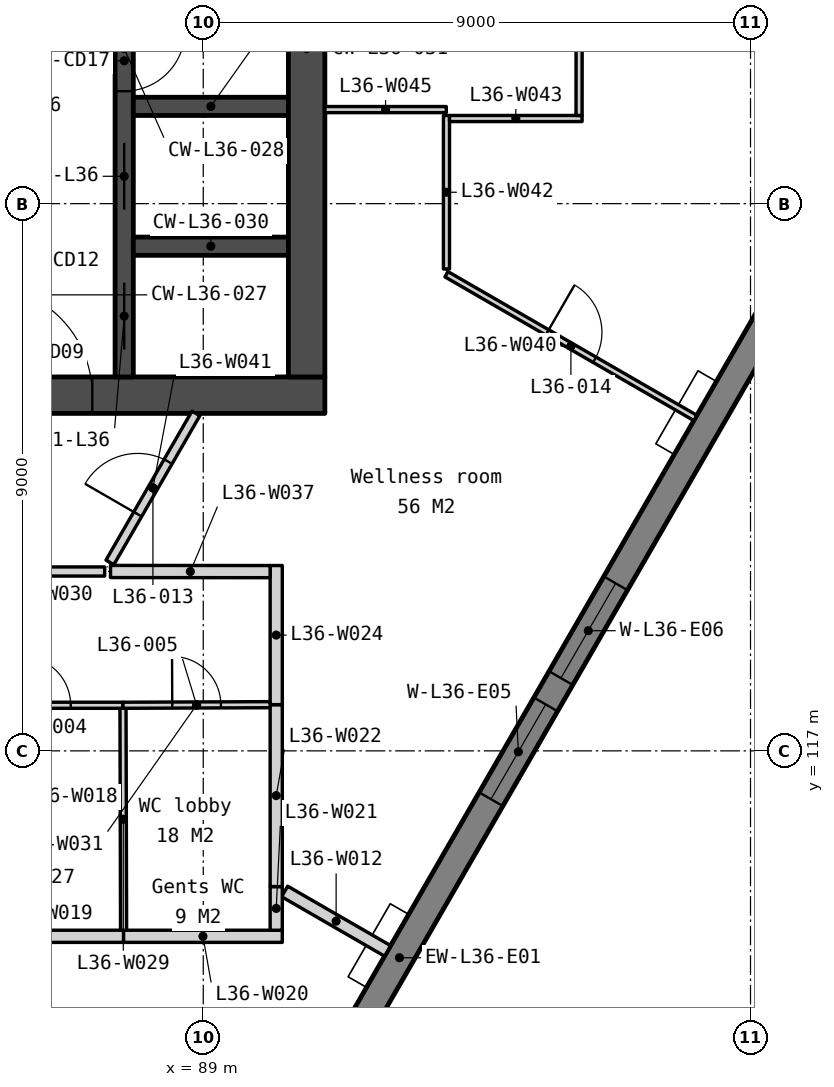
"""IFC4 building model, lengths in metres.
Left out: names, types, materials, properties, quantities, classifications, styles, units other than length and angle.
Written with IfcOpenShell. Run it as: python <this file> out.ifc"""

import sys

from ifc_helpers import new_model, si_unit, direction, frame, frame_2d, origin, place, context, subcontext, project, spatial, polyline, rectangle, outline, extrude, element, fill, save


model = new_model("IFC4")
c1 = context("Model", 3, precision=1e-05, world=origin(), true_north=direction((0.0, 1.0)))
c2 = subcontext(c1, "Body", "Model", "MODEL_VIEW")
j1 = project(units=[si_unit("LENGTHUNIT", "METRE"), si_unit("PLANEANGLEUNIT", "RADIAN")], contexts=[c1])
p1 = place(None, origin())
s1 = spatial("IfcSite", under=j1, at=p1, CompositionType="ELEMENT")
p2 = place(p1, origin())
s2 = spatial("IfcBuilding", under=s1, at=p2, CompositionType="ELEMENT")
p3 = place(p2, frame((0.0, 0.0, 144.2)))
s3 = spatial("IfcBuildingStorey", under=s2, at=p3, CompositionType="ELEMENT", Elevation=144.2)
p4 = place(p3, frame((69.0, 122.85, 0.0), z_axis=(0.0, 0.0, 1.0), x_axis=(1.0, 0.0, 0.0)))
e1 = element("IfcWall", 1, at=p4, inside=s3, PredefinedType="SOLIDWALL", context=c2, shape_type="SweptSolid", body=[
    extrude(rectangle(XDim=22.0, YDim=0.6, at=frame_2d((11.0, 0.0))), origin(), (0.0, 0.0, 1.0), 3.75),
])
p5 = place(p4, frame((16.375, 0.0, 0.0)))
e2 = element("IfcOpeningElement", 2, at=p5, cuts=e1, PredefinedType="OPENING", context=c2, shape_type="SweptSolid", body=[
    extrude(rectangle(XDim=1.8, YDim=2.1, at=frame_2d((0.9, 1.05))), frame((0.0, 0.31, 0.0), z_axis=(0.0, -1.0, 0.0), x_axis=(1.0, 0.0, 0.0)), (0.0, 0.0, 1.0), 0.62),
])
p6 = place(p4, frame((3.825, 0.0, 0.0)))
e3 = element("IfcOpeningElement", 3, at=p6, cuts=e1, PredefinedType="OPENING", context=c2, shape_type="SweptSolid", body=[
    extrude(rectangle(XDim=1.8, YDim=2.1, at=frame_2d((0.9, 1.05))), frame((0.0, 0.31, 0.0), z_axis=(0.0, -1.0, 0.0), x_axis=(1.0, 0.0, 0.0)), (0.0, 0.0, 1.0), 0.62),
])
p7 = place(p4, frame((12.85, 0.0, 0.0)))
e4 = element("IfcOpeningElement", 4, at=p7, cuts=e1, PredefinedType="OPENING", context=c2, shape_type="SweptSolid", body=[
    extrude(rectangle(XDim=1.5, YDim=2.1, at=frame_2d((0.75, 1.05))), frame((0.0, 0.31, 0.0), z_axis=(0.0, -1.0, 0.0), x_axis=(1.0, 0.0, 0.0)), (0.0, 0.0, 1.0), 0.62),
])
p8 = place(p3, frame((87.7, 133.95, 0.0), z_axis=(0.0, 0.0, 1.0), x_axis=(0.0, -1.0, 0.0)))
e5 = element("IfcWall", 5, at=p8, inside=s3, PredefinedType="SOLIDWALL", context=c2, shape_type="SweptSolid", body=[
    extrude(rectangle(XDim=10.8, YDim=0.3, at=frame_2d((5.4, 0.0))), origin(), (0.0, 0.0, 1.0), 3.75),
])
p9 = place(p8, frame((6.95, 0.0, 0.0)))
e6 = element("IfcOpeningElement", 6, at=p9, cuts=e5, PredefinedType="OPENING", context=c2, shape_type="SweptSolid", body=[
    extrude(rectangle(XDim=1.1, YDim=2.1, at=frame_2d((0.55, 1.05))), frame((0.0, 0.16, 0.0), z_axis=(0.0, -1.0, 0.0), x_axis=(1.0, 0.0, 0.0)), (0.0, 0.0, 1.0), 0.32),
])
p10 = place(p8, frame((5.1, 0.0, 0.0)))
e7 = element("IfcOpeningElement", 7, at=p10, cuts=e5, PredefinedType="OPENING", context=c2, shape_type="SweptSolid", body=[
    extrude(rectangle(XDim=1.0, YDim=2.1, at=frame_2d((0.5, 1.05))), frame((0.0, 0.16, 0.0), z_axis=(0.0, -1.0, 0.0), x_axis=(1.0, 0.0, 0.0)), (0.0, 0.0, 1.0), 0.32),
])
p11 = place(p8, frame((9.25, 0.0, 0.0)))
e8 = element("IfcOpeningElement", 8, at=p11, cuts=e5, PredefinedType="OPENING", context=c2, shape_type="SweptSolid", body=[
    extrude(rectangle(XDim=1.1, YDim=2.1, at=frame_2d((0.55, 1.05))), frame((0.0, 0.16, 0.0), z_axis=(0.0, -1.0, 0.0), x_axis=(1.0, 0.0, 0.0)), (0.0, 0.0, 1.0), 0.32),
])
for number, where, z_axis, x_axis in (
    (9, (87.85, 127.6, 0.0), (0.0, 0.0, 1.0), (1.0, 0.0, 0.0)),
    (10, (87.85, 125.3, 0.0), (0.0, 0.0, 1.0), (1.0, 0.0, 0.0)),
):
    element("IfcWall", number, at=place(p3, frame(where, z_axis=z_axis, x_axis=x_axis)), inside=s3, PredefinedType="SOLIDWALL", context=c2, shape_type="SweptSolid", body=[
        extrude(rectangle(XDim=2.55, YDim=0.3, at=frame_2d((1.275, 0.0))), origin(), (0.0, 0.0, 1.0), 3.75),
    ])
p12 = place(p3, frame((90.7, 133.95, 0.0), z_axis=(0.0, 0.0, 1.0), x_axis=(0.0, -1.0, 0.0)))
e11 = element("IfcWall", 11, at=p12, inside=s3, PredefinedType="SOLIDWALL", context=c2, shape_type="SweptSolid", body=[
    extrude(rectangle(XDim=10.8, YDim=0.6, at=frame_2d((5.4, 0.0))), origin(), (0.0, 0.0, 1.0), 3.75),
])
p13 = place(p3, frame((82.105, 96.067, -0.15), z_axis=(0.0, 0.0, 1.0), x_axis=(0.499997369791, 0.866026922331, 0.0)))
e12 = element("IfcWall", 12, at=p13, inside=s3, PredefinedType="SOLIDWALL", context=c2, shape_type="SweptSolid", body=[
    extrude(outline(polyline([(40.486, 0.0), (40.486, 3.9), (0.0, 3.9), (0.0, 0.0), (40.486, 0.0)])), frame((0.0, 0.225, 0.0), z_axis=(0.0, -1.0, 0.0), x_axis=(1.0, 0.0, 0.0)), (0.0, 0.0, 1.0), 0.45),
])
p14 = place(p13, frame((3.011, 0.0, 0.95)))
e13 = element("IfcOpeningElement", 13, at=p14, cuts=e12, PredefinedType="OPENING", context=c2, shape_type="SweptSolid", body=[
    extrude(rectangle(XDim=1.8, YDim=2.2, at=frame_2d((0.9, 1.1))), frame((0.0, 0.235, 0.0), z_axis=(0.0, -1.0, 0.0), x_axis=(1.0, 0.0, 0.0)), (0.0, 0.0, 1.0), 0.47),
])
p15 = place(p13, frame((5.311, 0.0, 0.95)))
e14 = element("IfcOpeningElement", 14, at=p15, cuts=e12, PredefinedType="OPENING", context=c2, shape_type="SweptSolid", body=[
    extrude(rectangle(XDim=1.8, YDim=2.2, at=frame_2d((0.9, 1.1))), frame((0.0, 0.235, 0.0), z_axis=(0.0, -1.0, 0.0), x_axis=(1.0, 0.0, 0.0)), (0.0, 0.0, 1.0), 0.47),
])
p16 = place(p13, frame((13.132, 0.0, 0.95)))
e15 = element("IfcOpeningElement", 15, at=p16, cuts=e12, PredefinedType="OPENING", context=c2, shape_type="SweptSolid", body=[
    extrude(rectangle(XDim=1.8, YDim=2.2, at=frame_2d((0.9, 1.1))), frame((0.0, 0.235, 0.0), z_axis=(0.0, -1.0, 0.0), x_axis=(1.0, 0.0, 0.0)), (0.0, 0.0, 1.0), 0.47),
])
p17 = place(p13, frame((15.432, 0.0, 0.95)))
e16 = element("IfcOpeningElement", 16, at=p17, cuts=e12, PredefinedType="OPENING", context=c2, shape_type="SweptSolid", body=[
    extrude(rectangle(XDim=1.8, YDim=2.2, at=frame_2d((0.9, 1.1))), frame((0.0, 0.235, 0.0), z_axis=(0.0, -1.0, 0.0), x_axis=(1.0, 0.0, 0.0)), (0.0, 0.0, 1.0), 0.47),
])
p18 = place(p13, frame((23.254, 0.0, 0.95)))
e17 = element("IfcOpeningElement", 17, at=p18, cuts=e12, PredefinedType="OPENING", context=c2, shape_type="SweptSolid", body=[
    extrude(rectangle(XDim=1.8, YDim=2.2, at=frame_2d((0.9, 1.1))), frame((0.0, 0.235, 0.0), z_axis=(0.0, -1.0, 0.0), x_axis=(1.0, 0.0, 0.0)), (0.0, 0.0, 1.0), 0.47),
])
p19 = place(p13, frame((25.554, 0.0, 0.95)))
e18 = element("IfcOpeningElement", 18, at=p19, cuts=e12, PredefinedType="OPENING", context=c2, shape_type="SweptSolid", body=[
    extrude(rectangle(XDim=1.8, YDim=2.2, at=frame_2d((0.9, 1.1))), frame((0.0, 0.235, 0.0), z_axis=(0.0, -1.0, 0.0), x_axis=(1.0, 0.0, 0.0)), (0.0, 0.0, 1.0), 0.47),
])
p20 = place(p13, frame((33.375, 0.0, 0.95)))
e19 = element("IfcOpeningElement", 19, at=p20, cuts=e12, PredefinedType="OPENING", context=c2, shape_type="SweptSolid", body=[
    extrude(rectangle(XDim=1.8, YDim=2.2, at=frame_2d((0.9, 1.1))), frame((0.0, 0.235, 0.0), z_axis=(0.0, -1.0, 0.0), x_axis=(1.0, 0.0, 0.0)), (0.0, 0.0, 1.0), 0.47),
])
p21 = place(p13, frame((35.675, 0.0, 0.95)))
e20 = element("IfcOpeningElement", 20, at=p21, cuts=e12, PredefinedType="OPENING", context=c2, shape_type="SweptSolid", body=[
    extrude(rectangle(XDim=1.8, YDim=2.2, at=frame_2d((0.9, 1.1))), frame((0.0, 0.235, 0.0), z_axis=(0.0, -1.0, 0.0), x_axis=(1.0, 0.0, 0.0)), (0.0, 0.0, 1.0), 0.47),
])
p22 = place(p3, frame((83.374, 112.865, 0.0), z_axis=(0.0, 0.0, 1.0), x_axis=(0.866021813296, -0.500006218857, 0.0)))
e21 = element("IfcWall", 21, at=p22, inside=s3, PredefinedType="PARTITIONING", context=c2, shape_type="SweptSolid", body=[
    extrude(rectangle(XDim=7.075, YDim=0.1, at=frame_2d((3.538, 0.0))), origin(), (0.0, 0.0, 1.0), 3.75),
])
p23 = place(p22, frame((3.087, 0.0, 0.0)))
e22 = element("IfcOpeningElement", 22, at=p23, cuts=e21, PredefinedType="OPENING", context=c2, shape_type="SweptSolid", body=[
    extrude(rectangle(XDim=0.9, YDim=2.1, at=frame_2d((0.45, 1.05))), frame((0.0, 0.06, 0.0), z_axis=(0.0, -1.0, 0.0), x_axis=(1.0, 0.0, 0.0)), (0.0, 0.0, 1.0), 0.12),
])
p24 = place(p3, frame((90.339, 114.688, 0.0), z_axis=(0.0, 0.0, 1.0), x_axis=(0.866021300503, -0.500007107024, 0.0)))
e23 = element("IfcWall", 23, at=p24, inside=s3, PredefinedType="PARTITIONING", context=c2, shape_type="SweptSolid", body=[
    extrude(rectangle(XDim=1.955, YDim=0.2, at=frame_2d((0.978, 0.0))), origin(), (0.0, 0.0, 1.0), 3.75),
])
p25 = place(p3, frame((85.15, 113.95, 0.0), z_axis=(0.0, 0.0, 1.0), x_axis=(1.0, 0.0, 0.0)))
e24 = element("IfcWall", 24, at=p25, inside=s3, PredefinedType="PARTITIONING", context=c2, shape_type="SweptSolid", body=[
    extrude(rectangle(XDim=2.54, YDim=0.2, at=frame_2d((1.27, 0.0))), origin(), (0.0, 0.0, 1.0), 3.75),
])
p26 = place(p3, frame((87.69, 113.95, 0.0), z_axis=(0.0, 0.0, 1.0), x_axis=(1.0, 0.0, 0.0)))
e25 = element("IfcWall", 25, at=p26, inside=s3, PredefinedType="PARTITIONING", context=c2, shape_type="SweptSolid", body=[
    extrude(rectangle(XDim=2.61, YDim=0.2, at=frame_2d((1.305, 0.0))), origin(), (0.0, 0.0, 1.0), 3.75),
])
p27 = place(p3, frame((90.2, 114.05, 0.0), z_axis=(0.0, 0.0, 1.0), x_axis=(0.0, 1.0, 0.0)))
e26 = element("IfcWall", 26, at=p27, inside=s3, PredefinedType="PARTITIONING", context=c2, shape_type="SweptSolid", body=[
    extrude(rectangle(XDim=0.718, YDim=0.2, at=frame_2d((0.359, 0.0))), origin(), (0.0, 0.0, 1.0), 3.75),
])
p28 = place(p3, frame((90.2, 114.768, 0.0), z_axis=(0.0, 0.0, 1.0), x_axis=(0.0, 1.0, 0.0)))
e27 = element("IfcWall", 27, at=p28, inside=s3, PredefinedType="PARTITIONING", context=c2, shape_type="SweptSolid", body=[
    extrude(rectangle(XDim=2.992, YDim=0.2, at=frame_2d((1.496, 0.0))), origin(), (0.0, 0.0, 1.0), 3.75),
])
p29 = place(p3, frame((90.2, 117.76, 0.0), z_axis=(0.0, 0.0, 1.0), x_axis=(0.0, 1.0, 0.0)))
e28 = element("IfcWall", 28, at=p29, inside=s3, PredefinedType="PARTITIONING", context=c2, shape_type="SweptSolid", body=[
    extrude(rectangle(XDim=2.288, YDim=0.2, at=frame_2d((1.144, 0.0))), origin(), (0.0, 0.0, 1.0), 3.75),
])
p30 = place(p3, frame((87.69, 114.05, 0.0), z_axis=(0.0, 0.0, 1.0), x_axis=(-0.002608686776, 0.999996597371, 0.0)))
e29 = element("IfcWall", 29, at=p30, inside=s3, PredefinedType="PARTITIONING", context=c2, shape_type="SweptSolid", body=[
    extrude(rectangle(XDim=3.65, YDim=0.1, at=frame_2d((1.825, 0.0))), origin(), (0.0, 0.0, 1.0), 3.75),
])
p31 = place(p3, frame((85.16, 117.75, 0.0), z_axis=(0.0, 0.0, 1.0), x_axis=(1.0, 0.0, 0.0)))
e30 = element("IfcWall", 30, at=p31, inside=s3, PredefinedType="PARTITIONING", context=c2, shape_type="SweptSolid", body=[
    extrude(rectangle(XDim=2.52, YDim=0.1, at=frame_2d((1.26, 0.0))), origin(), (0.0, 0.0, 1.0), 3.75),
])
p32 = place(p31, frame((0.86, 0.0, 0.0)))
e31 = element("IfcOpeningElement", 31, at=p32, cuts=e30, PredefinedType="OPENING", context=c2, shape_type="SweptSolid", body=[
    extrude(rectangle(XDim=0.8, YDim=2.1, at=frame_2d((0.4, 1.05))), frame((0.0, 0.06, 0.0), z_axis=(0.0, -1.0, 0.0), x_axis=(1.0, 0.0, 0.0)), (0.0, 0.0, 1.0), 0.12),
])
p33 = place(p3, frame((87.68, 117.75, 0.0), z_axis=(0.0, 0.0, 1.0), x_axis=(0.999992261016, 0.003934197335, 0.0)))
e32 = element("IfcWall", 32, at=p33, inside=s3, PredefinedType="PARTITIONING", context=c2, shape_type="SweptSolid", body=[
    extrude(rectangle(XDim=2.42, YDim=0.1, at=frame_2d((1.21, 0.0))), origin(), (0.0, 0.0, 1.0), 3.75),
])
p34 = place(p33, frame((0.81, 0.0, 0.0)))
e33 = element("IfcOpeningElement", 33, at=p34, cuts=e32, PredefinedType="OPENING", context=c2, shape_type="SweptSolid", body=[
    extrude(rectangle(XDim=0.8, YDim=2.1, at=frame_2d((0.4, 1.05))), frame((0.0, 0.06, 0.0), z_axis=(0.0, -1.0, 0.0), x_axis=(1.0, 0.0, 0.0)), (0.0, 0.0, 1.0), 0.12),
])
p35 = place(p3, frame((81.2, 119.95, 0.0), z_axis=(0.0, 0.0, 1.0), x_axis=(1.0, 0.0, 0.0)))
e34 = element("IfcWall", 34, at=p35, inside=s3, PredefinedType="PARTITIONING", context=c2, shape_type="SweptSolid", body=[
    extrude(rectangle(XDim=6.178, YDim=0.15, at=frame_2d((3.089, 0.0))), origin(), (0.0, 0.0, 1.0), 3.75),
])
p36 = place(p35, frame((2.589, 0.0, 0.0)))
e35 = element("IfcOpeningElement", 35, at=p36, cuts=e34, PredefinedType="OPENING", context=c2, shape_type="SweptSolid", body=[
    extrude(rectangle(XDim=1.0, YDim=2.1, at=frame_2d((0.5, 1.05))), frame((0.0, 0.085, 0.0), z_axis=(0.0, -1.0, 0.0), x_axis=(1.0, 0.0, 0.0)), (0.0, 0.0, 1.0), 0.17),
])
p37 = place(p3, frame((87.475, 119.95, 0.0), z_axis=(0.0, 0.0, 1.0), x_axis=(0.999999723197, -0.000744047413, 0.0)))
e36 = element("IfcWall", 36, at=p37, inside=s3, PredefinedType="PARTITIONING", context=c2, shape_type="SweptSolid", body=[
    extrude(rectangle(XDim=2.625, YDim=0.2, at=frame_2d((1.312, 0.0))), origin(), (0.0, 0.0, 1.0), 3.75),
])
p38 = place(p3, frame((93.0, 124.839, 0.0), z_axis=(0.0, 0.0, 1.0), x_axis=(0.866028145587, -0.499995251029, 0.0)))
e37 = element("IfcWall", 37, at=p38, inside=s3, PredefinedType="PARTITIONING", context=c2, shape_type="SweptSolid", body=[
    extrude(rectangle(XDim=4.726, YDim=0.1, at=frame_2d((2.363, 0.0))), origin(), (0.0, 0.0, 1.0), 3.75),
])
p39 = place(p38, frame((1.913, 0.0, 0.0)))
e38 = element("IfcOpeningElement", 38, at=p39, cuts=e37, PredefinedType="OPENING", context=c2, shape_type="SweptSolid", body=[
    extrude(rectangle(XDim=0.9, YDim=2.1, at=frame_2d((0.45, 1.05))), frame((0.0, 0.06, 0.0), z_axis=(0.0, -1.0, 0.0), x_axis=(1.0, 0.0, 0.0)), (0.0, 0.0, 1.0), 0.12),
])
p40 = place(p3, frame((87.465, 120.1, 0.0), z_axis=(0.0, 0.0, 1.0), x_axis=(0.499991416419, 0.86603035946, 0.0)))
e39 = element("IfcWall", 39, at=p40, inside=s3, PredefinedType="PARTITIONING", context=c2, shape_type="SweptSolid", body=[
    extrude(rectangle(XDim=2.829, YDim=0.15, at=frame_2d((1.414, 0.0))), origin(), (0.0, 0.0, 1.0), 3.75),
])
p41 = place(p40, frame((0.914, 0.0, 0.0)))
e40 = element("IfcOpeningElement", 40, at=p41, cuts=e39, PredefinedType="OPENING", context=c2, shape_type="SweptSolid", body=[
    extrude(rectangle(XDim=1.0, YDim=2.1, at=frame_2d((0.5, 1.05))), frame((0.0, 0.085, 0.0), z_axis=(0.0, -1.0, 0.0), x_axis=(1.0, 0.0, 0.0)), (0.0, 0.0, 1.0), 0.17),
])
p42 = place(p3, frame((93.0, 124.925, 0.0), z_axis=(0.0, 0.0, 1.0), x_axis=(0.0, 1.0, 0.0)))
e41 = element("IfcWall", 41, at=p42, inside=s3, PredefinedType="PARTITIONING", context=c2, shape_type="SweptSolid", body=[
    extrude(rectangle(XDim=2.525, YDim=0.1, at=frame_2d((1.262, 0.0))), origin(), (0.0, 0.0, 1.0), 3.75),
])
p43 = place(p3, frame((93.05, 127.4, 0.0), z_axis=(0.0, 0.0, 1.0), x_axis=(1.0, 0.0, 0.0)))
e42 = element("IfcWall", 42, at=p43, inside=s3, PredefinedType="PARTITIONING", context=c2, shape_type="SweptSolid", body=[
    extrude(rectangle(XDim=2.18, YDim=0.1, at=frame_2d((1.09, 0.0))), origin(), (0.0, 0.0, 1.0), 3.75),
])
p44 = place(p3, frame((95.18, 127.45, 0.0), z_axis=(0.0, 0.0, 1.0), x_axis=(0.000687710449, 0.999999763527, 0.0)))
e43 = element("IfcWall", 43, at=p44, inside=s3, PredefinedType="PARTITIONING", context=c2, shape_type="SweptSolid", body=[
    extrude(rectangle(XDim=7.1, YDim=0.1, at=frame_2d((3.55, 0.0))), origin(), (0.0, 0.0, 1.0), 3.75),
])
p45 = place(p44, frame((3.1, 0.0, 0.0)))
e44 = element("IfcOpeningElement", 44, at=p45, cuts=e43, PredefinedType="OPENING", context=c2, shape_type="SweptSolid", body=[
    extrude(rectangle(XDim=0.9, YDim=2.1, at=frame_2d((0.45, 1.05))), frame((0.0, 0.06, 0.0), z_axis=(0.0, -1.0, 0.0), x_axis=(1.0, 0.0, 0.0)), (0.0, 0.0, 1.0), 0.12),
])
p46 = place(p3, frame((91.0, 127.547, 0.0), z_axis=(0.0, 0.0, 1.0), x_axis=(1.0, 0.0, 0.0)))
e45 = element("IfcWall", 45, at=p46, inside=s3, PredefinedType="PARTITIONING", context=c2, shape_type="SweptSolid", body=[
    extrude(rectangle(XDim=1.997, YDim=0.1, at=frame_2d((0.999, 0.0))), origin(), (0.0, 0.0, 1.0), 3.75),
])
p47 = place(p9, origin())
e46 = element("IfcDoor", 46, at=p47, inside=s3, OperationType="SLIDING_TO_LEFT", PredefinedType="DOOR", context=c2, shape_type="SweptSolid", body=[
    extrude(rectangle(XDim=1.1, YDim=2.1, at=frame_2d((0.55, 1.05))), frame((0.0, 0.025, 0.0), z_axis=(0.0, -1.0, 0.0), x_axis=(1.0, 0.0, 0.0)), (0.0, 0.0, 1.0), 0.05),
])
fill(e6, e46)
p48 = place(p5, origin())
e47 = element("IfcDoor", 47, at=p48, inside=s3, OperationType="DOUBLE_DOOR_DOUBLE_SWING", PredefinedType="DOOR", context=c2, shape_type="SweptSolid", body=[
    extrude(rectangle(XDim=1.8, YDim=2.1, at=frame_2d((0.9, 1.05))), frame((0.0, 0.025, 0.0), z_axis=(0.0, -1.0, 0.0), x_axis=(1.0, 0.0, 0.0)), (0.0, 0.0, 1.0), 0.05),
])
fill(e2, e47)
p49 = place(p10, origin())
e48 = element("IfcDoor", 48, at=p49, inside=s3, OperationType="SINGLE_SWING_LEFT", PredefinedType="DOOR", context=c2, shape_type="SweptSolid", body=[
    extrude(rectangle(XDim=1.0, YDim=2.1, at=frame_2d((0.5, 1.05))), frame((0.0, 0.025, 0.0), z_axis=(0.0, -1.0, 0.0), x_axis=(1.0, 0.0, 0.0)), (0.0, 0.0, 1.0), 0.05),
])
fill(e7, e48)
p50 = place(p11, origin())
e49 = element("IfcDoor", 49, at=p50, inside=s3, OperationType="SLIDING_TO_LEFT", PredefinedType="DOOR", context=c2, shape_type="SweptSolid", body=[
    extrude(rectangle(XDim=1.1, YDim=2.1, at=frame_2d((0.55, 1.05))), frame((0.0, 0.025, 0.0), z_axis=(0.0, -1.0, 0.0), x_axis=(1.0, 0.0, 0.0)), (0.0, 0.0, 1.0), 0.05),
])
fill(e8, e49)
p51 = place(p18, origin())
e50 = element("IfcWindow", 50, at=p51, inside=s3, PartitioningType="SINGLE_PANEL", PredefinedType="WINDOW", context=c2, shape_type="SweptSolid", body=[
    extrude(rectangle(XDim=1.8, YDim=2.2, at=frame_2d((0.9, 1.1))), frame((0.0, 0.03, 0.0), z_axis=(0.0, -1.0, 0.0), x_axis=(1.0, 0.0, 0.0)), (0.0, 0.0, 1.0), 0.06),
])
fill(e17, e50)
p52 = place(p19, origin())
e51 = element("IfcWindow", 51, at=p52, inside=s3, PartitioningType="SINGLE_PANEL", PredefinedType="WINDOW", context=c2, shape_type="SweptSolid", body=[
    extrude(rectangle(XDim=1.8, YDim=2.2, at=frame_2d((0.9, 1.1))), frame((0.0, 0.03, 0.0), z_axis=(0.0, -1.0, 0.0), x_axis=(1.0, 0.0, 0.0)), (0.0, 0.0, 1.0), 0.06),
])
fill(e18, e51)
p53 = place(p32, origin())
e52 = element("IfcDoor", 52, at=p53, inside=s3, OperationType="SINGLE_SWING_LEFT", PredefinedType="DOOR", context=c2, shape_type="SweptSolid", body=[
    extrude(rectangle(XDim=0.8, YDim=2.1, at=frame_2d((0.4, 1.05))), frame((0.0, 0.025, 0.0), z_axis=(0.0, -1.0, 0.0), x_axis=(1.0, 0.0, 0.0)), (0.0, 0.0, 1.0), 0.05),
])
fill(e31, e52)
p54 = place(p34, origin())
e53 = element("IfcDoor", 53, at=p54, inside=s3, OperationType="SINGLE_SWING_LEFT", PredefinedType="DOOR", context=c2, shape_type="SweptSolid", body=[
    extrude(rectangle(XDim=0.8, YDim=2.1, at=frame_2d((0.4, 1.05))), frame((0.0, 0.025, 0.0), z_axis=(0.0, -1.0, 0.0), x_axis=(1.0, 0.0, 0.0)), (0.0, 0.0, 1.0), 0.05),
])
fill(e33, e53)
p55 = place(p41, origin())
e54 = element("IfcDoor", 54, at=p55, inside=s3, OperationType="SINGLE_SWING_LEFT", PredefinedType="DOOR", context=c2, shape_type="SweptSolid", body=[
    extrude(rectangle(XDim=1.0, YDim=2.1, at=frame_2d((0.5, 1.05))), frame((0.0, 0.025, 0.0), z_axis=(0.0, -1.0, 0.0), x_axis=(1.0, 0.0, 0.0)), (0.0, 0.0, 1.0), 0.05),
])
fill(e40, e54)
p56 = place(p39, origin())
e55 = element("IfcDoor", 55, at=p56, inside=s3, OperationType="SINGLE_SWING_LEFT", PredefinedType="DOOR", context=c2, shape_type="SweptSolid", body=[
    extrude(rectangle(XDim=0.9, YDim=2.1, at=frame_2d((0.45, 1.05))), frame((0.0, 0.025, 0.0), z_axis=(0.0, -1.0, 0.0), x_axis=(1.0, 0.0, 0.0)), (0.0, 0.0, 1.0), 0.05),
])
fill(e38, e55)
save(model, sys.argv[1])
